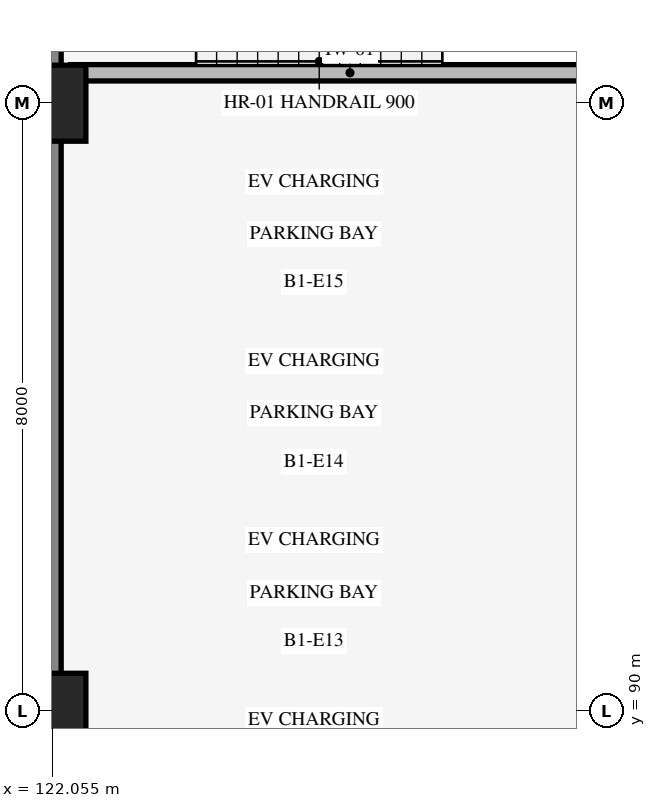
"""IFC4 building model, lengths in metres.
Left out: names, types, materials, properties, quantities, classifications, styles, units other than length and angle.
Written with IfcOpenShell. Run it as: python <this file> out.ifc"""

import sys

from ifc_helpers import new_model, si_unit, direction, frame, frame_2d, origin, origin_2d, place, context, subcontext, project, spatial, rectangle, extrude, element, save


model = new_model("IFC4")
c1 = context("Model", 3, precision=1e-05, world=origin(), true_north=direction((0.0, 1.0)))
c2 = subcontext(c1, "Body", "Model", "MODEL_VIEW")
j1 = project(units=[si_unit("LENGTHUNIT", "METRE"), si_unit("PLANEANGLEUNIT", "RADIAN")], contexts=[c1])
p1 = place(None, origin())
s1 = spatial("IfcSite", under=j1, at=p1, CompositionType="ELEMENT")
p2 = place(p1, origin())
s2 = spatial("IfcBuilding", under=s1, at=p2, CompositionType="ELEMENT")
p3 = place(p2, frame((0.0, 0.0, -4.5)))
s3 = spatial("IfcBuildingStorey", under=s2, at=p3, CompositionType="ELEMENT", Elevation=-4.5)
p4 = place(p3, frame((122.0, 106.0, 0.0), z_axis=(0.0, 0.0, 1.0), x_axis=(0.0, -1.0, 0.0)))
e1 = element("IfcWall", 1, at=p4, inside=s3, PredefinedType="SOLIDWALL", context=c2, shape_type="SweptSolid", body=[
    extrude(rectangle(XDim=80.0, YDim=0.35, at=frame_2d((40.0, 0.0))), origin(), (0.0, 0.0, 1.0), 4.22),
])
for number, where, z_axis, x_axis in (
    (2, (122.0, 90.0, 0.0), (0.0, 0.0, 1.0), (1.0, 0.0, 0.0)),
    (3, (122.0, 98.0, 0.0), (0.0, 0.0, 1.0), (1.0, 0.0, 0.0)),
):
    element("IfcColumn", number, at=place(p3, frame(where, z_axis=z_axis, x_axis=x_axis)), inside=s3, PredefinedType="COLUMN", context=c2, shape_type="SweptSolid", body=[
        extrude(rectangle(XDim=1.0, YDim=1.0, at=origin_2d()), origin(), (0.0, 0.0, 1.0), 4.5),
    ])
p5 = place(p3, frame((129.75, 98.4, 0.0), z_axis=(0.0, 0.0, 1.0), x_axis=(-1.0, 0.0, 0.0)))
e4 = element("IfcWall", 4, at=p5, inside=s3, PredefinedType="STANDARD", context=c2, shape_type="SweptSolid", body=[
    extrude(rectangle(XDim=7.45, YDim=0.215, at=frame_2d((3.725, 0.0))), origin(), (0.0, 0.0, 1.0), 3.03),
])
save(model, sys.argv[1])
